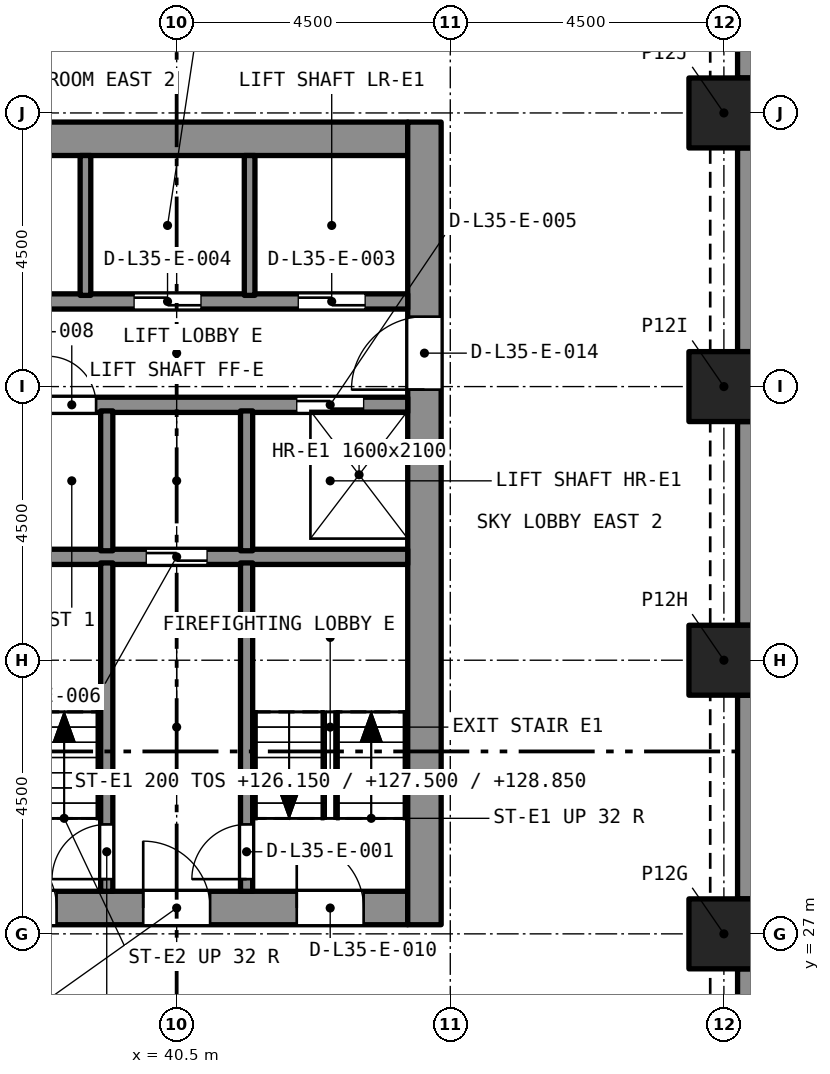
"""IFC4 building model, lengths in metres.
Left out: names, types, materials, properties, quantities, classifications, styles, units other than length and angle.
Written with IfcOpenShell. Run it as: python <this file> out.ifc"""

import sys

from ifc_helpers import new_model, si_unit, direction, frame, frame_2d, origin, origin_2d, place, context, subcontext, project, spatial, rectangle, extrude, element, fill, save


model = new_model("IFC4")
c1 = context("Model", 3, precision=1e-05, world=origin(), true_north=direction((0.0, 1.0)))
c2 = subcontext(c1, "Body", "Model", "MODEL_VIEW")
j1 = project(units=[si_unit("LENGTHUNIT", "METRE"), si_unit("PLANEANGLEUNIT", "RADIAN")], contexts=[c1])
p1 = place(None, origin())
s1 = spatial("IfcSite", under=j1, at=p1, CompositionType="ELEMENT")
p2 = place(p1, origin())
s2 = spatial("IfcBuilding", under=s1, at=p2, CompositionType="ELEMENT")
p3 = place(p2, frame((0.0, 0.0, 124.8)))
s3 = spatial("IfcBuildingStorey", under=s2, at=p3, CompositionType="ELEMENT", Elevation=124.8)
for number, where, z_axis, x_axis in (
    (1, (49.5, 27.0, 0.0), (0.0, 0.0, 1.0), (1.0, 0.0, 0.0)),
    (2, (49.5, 31.5, 0.0), (0.0, 0.0, 1.0), (1.0, 0.0, 0.0)),
    (3, (49.5, 36.0, 0.0), (0.0, 0.0, 1.0), (1.0, 0.0, 0.0)),
    (4, (49.5, 40.5, 0.0), (0.0, 0.0, 1.0), (1.0, 0.0, 0.0)),
):
    element("IfcColumn", number, at=place(p3, frame(where, z_axis=z_axis, x_axis=x_axis)), inside=s3, PredefinedType="COLUMN", context=c2, shape_type="SweptSolid", body=[
        extrude(rectangle(XDim=1.15, YDim=1.15, at=origin_2d()), origin(), (0.0, 0.0, 1.0), 5.4),
    ])
p4 = place(p3, frame((36.7, 27.425, 0.0), z_axis=(0.0, 0.0, 1.0), x_axis=(1.0, 0.0, 0.0)))
e5 = element("IfcWall", 5, at=p4, inside=s3, PredefinedType="SOLIDWALL", context=c2, shape_type="SweptSolid", body=[
    extrude(rectangle(XDim=7.6, YDim=0.55, at=frame_2d((3.8, 0.0))), origin(), (0.0, 0.0, 1.0), 5.4),
])
p5 = place(p4, frame((5.775, 0.0, 0.0)))
e6 = element("IfcOpeningElement", 6, at=p5, cuts=e5, PredefinedType="OPENING", context=c2, shape_type="SweptSolid", body=[
    extrude(rectangle(XDim=1.1, YDim=2.1, at=frame_2d((0.55, 1.05))), frame((0.0, 0.285, 0.0), z_axis=(0.0, -1.0, 0.0), x_axis=(1.0, 0.0, 0.0)), (0.0, 0.0, 1.0), 0.57),
])
p6 = place(p4, frame((3.25, 0.0, 0.0)))
e7 = element("IfcOpeningElement", 7, at=p6, cuts=e5, PredefinedType="OPENING", context=c2, shape_type="SweptSolid", body=[
    extrude(rectangle(XDim=1.1, YDim=2.1, at=frame_2d((0.55, 1.05))), frame((0.0, 0.285, 0.0), z_axis=(0.0, -1.0, 0.0), x_axis=(1.0, 0.0, 0.0)), (0.0, 0.0, 1.0), 0.57),
])
p7 = place(p4, frame((0.725, 0.0, 0.0)))
e8 = element("IfcOpeningElement", 8, at=p7, cuts=e5, PredefinedType="OPENING", context=c2, shape_type="SweptSolid", body=[
    extrude(rectangle(XDim=1.1, YDim=2.1, at=frame_2d((0.55, 1.05))), frame((0.0, 0.285, 0.0), z_axis=(0.0, -1.0, 0.0), x_axis=(1.0, 0.0, 0.0)), (0.0, 0.0, 1.0), 0.57),
])
p8 = place(p3, frame((36.7, 40.075, 0.0), z_axis=(0.0, 0.0, 1.0), x_axis=(1.0, 0.0, 0.0)))
e9 = element("IfcWall", 9, at=p8, inside=s3, PredefinedType="SOLIDWALL", context=c2, shape_type="SweptSolid", body=[
    extrude(rectangle(XDim=7.6, YDim=0.55, at=frame_2d((3.8, 0.0))), origin(), (0.0, 0.0, 1.0), 5.4),
])
p9 = place(p3, frame((44.575, 27.15, 0.0), z_axis=(0.0, 0.0, 1.0), x_axis=(0.0, 1.0, 0.0)))
e10 = element("IfcWall", 10, at=p9, inside=s3, PredefinedType="SOLIDWALL", context=c2, shape_type="SweptSolid", body=[
    extrude(rectangle(XDim=13.2, YDim=0.55, at=frame_2d((6.6, 0.0))), origin(), (0.0, 0.0, 1.0), 5.4),
])
p10 = place(p9, frame((8.8, 0.0, 0.0)))
e11 = element("IfcOpeningElement", 11, at=p10, cuts=e10, PredefinedType="OPENING", context=c2, shape_type="SweptSolid", body=[
    extrude(rectangle(XDim=1.2, YDim=2.1, at=frame_2d((0.6, 1.05))), frame((0.0, 0.285, 0.0), z_axis=(0.0, -1.0, 0.0), x_axis=(1.0, 0.0, 0.0)), (0.0, 0.0, 1.0), 0.57),
])
for number, where, z_axis, x_axis in (
    (12, (49.875, 26.425, 0.0), (0.0, 0.0, 1.0), (0.0, -1.0, 0.0)),
    (13, (49.875, 30.925, 0.0), (0.0, 0.0, 1.0), (0.0, -1.0, 0.0)),
    (14, (49.875, 35.425, 0.0), (0.0, 0.0, 1.0), (0.0, -1.0, 0.0)),
    (15, (49.875, 39.925, 0.0), (0.0, 0.0, 1.0), (0.0, -1.0, 0.0)),
    (16, (49.875, 44.425, 0.0), (0.0, 0.0, 1.0), (0.0, -1.0, 0.0)),
):
    element("IfcWall", number, at=place(p3, frame(where, z_axis=z_axis, x_axis=x_axis)), inside=s3, PredefinedType="SOLIDWALL", context=c2, shape_type="SweptSolid", body=[
        extrude(rectangle(XDim=3.35, YDim=0.3, at=frame_2d((1.675, 0.0))), origin(), (0.0, 0.0, 1.0), 5.4),
    ])
p11 = place(p3, frame((36.7, 33.2, 0.0), z_axis=(0.0, 0.0, 1.0), x_axis=(1.0, 0.0, 0.0)))
e17 = element("IfcWall", 17, at=p11, inside=s3, PredefinedType="SOLIDWALL", context=c2, shape_type="SweptSolid", body=[
    extrude(rectangle(XDim=7.6, YDim=0.25, at=frame_2d((3.8, 0.0))), origin(), (0.0, 0.0, 1.0), 5.1),
])
p12 = place(p11, frame((3.3, 0.0, 0.0)))
e18 = element("IfcOpeningElement", 18, at=p12, cuts=e17, PredefinedType="OPENING", context=c2, shape_type="SweptSolid", body=[
    extrude(rectangle(XDim=1.0, YDim=2.1, at=frame_2d((0.5, 1.05))), frame((0.0, 0.135, 0.0), z_axis=(0.0, -1.0, 0.0), x_axis=(1.0, 0.0, 0.0)), (0.0, 0.0, 1.0), 0.27),
])
p13 = place(p3, frame((36.7, 35.7, 0.0), z_axis=(0.0, 0.0, 1.0), x_axis=(1.0, 0.0, 0.0)))
e19 = element("IfcWall", 19, at=p13, inside=s3, PredefinedType="SOLIDWALL", context=c2, shape_type="SweptSolid", body=[
    extrude(rectangle(XDim=7.6, YDim=0.25, at=frame_2d((3.8, 0.0))), origin(), (0.0, 0.0, 1.0), 5.1),
])
p14 = place(p13, frame((5.775, 0.0, 0.0)))
e20 = element("IfcOpeningElement", 20, at=p14, cuts=e19, PredefinedType="OPENING", context=c2, shape_type="SweptSolid", body=[
    extrude(rectangle(XDim=1.1, YDim=2.4, at=frame_2d((0.55, 1.2))), frame((0.0, 0.135, 0.0), z_axis=(0.0, -1.0, 0.0), x_axis=(1.0, 0.0, 0.0)), (0.0, 0.0, 1.0), 0.27),
])
p15 = place(p13, frame((1.675, 0.0, 0.0)))
e21 = element("IfcOpeningElement", 21, at=p15, cuts=e19, PredefinedType="OPENING", context=c2, shape_type="SweptSolid", body=[
    extrude(rectangle(XDim=0.8, YDim=2.1, at=frame_2d((0.4, 1.05))), frame((0.0, 0.135, 0.0), z_axis=(0.0, -1.0, 0.0), x_axis=(1.0, 0.0, 0.0)), (0.0, 0.0, 1.0), 0.27),
])
p16 = place(p13, frame((0.25, 0.0, 0.0)))
e22 = element("IfcOpeningElement", 22, at=p16, cuts=e19, PredefinedType="OPENING", context=c2, shape_type="SweptSolid", body=[
    extrude(rectangle(XDim=0.9, YDim=2.1, at=frame_2d((0.45, 1.05))), frame((0.0, 0.135, 0.0), z_axis=(0.0, -1.0, 0.0), x_axis=(1.0, 0.0, 0.0)), (0.0, 0.0, 1.0), 0.27),
])
p17 = place(p3, frame((36.7, 37.4, 0.0), z_axis=(0.0, 0.0, 1.0), x_axis=(1.0, 0.0, 0.0)))
e23 = element("IfcWall", 23, at=p17, inside=s3, PredefinedType="SOLIDWALL", context=c2, shape_type="SweptSolid", body=[
    extrude(rectangle(XDim=7.6, YDim=0.25, at=frame_2d((3.8, 0.0))), origin(), (0.0, 0.0, 1.0), 5.1),
])
p18 = place(p17, frame((5.8, 0.0, 0.0)))
e24 = element("IfcOpeningElement", 24, at=p18, cuts=e23, PredefinedType="OPENING", context=c2, shape_type="SweptSolid", body=[
    extrude(rectangle(XDim=1.1, YDim=2.4, at=frame_2d((0.55, 1.2))), frame((0.0, 0.135, 0.0), z_axis=(0.0, -1.0, 0.0), x_axis=(1.0, 0.0, 0.0)), (0.0, 0.0, 1.0), 0.27),
])
p19 = place(p17, frame((3.1, 0.0, 0.0)))
e25 = element("IfcOpeningElement", 25, at=p19, cuts=e23, PredefinedType="OPENING", context=c2, shape_type="SweptSolid", body=[
    extrude(rectangle(XDim=1.1, YDim=2.4, at=frame_2d((0.55, 1.2))), frame((0.0, 0.135, 0.0), z_axis=(0.0, -1.0, 0.0), x_axis=(1.0, 0.0, 0.0)), (0.0, 0.0, 1.0), 0.27),
])
p20 = place(p17, frame((0.75, 0.0, 0.0)))
e26 = element("IfcOpeningElement", 26, at=p20, cuts=e23, PredefinedType="OPENING", context=c2, shape_type="SweptSolid", body=[
    extrude(rectangle(XDim=0.7, YDim=2.1, at=frame_2d((0.35, 1.05))), frame((0.0, 0.135, 0.0), z_axis=(0.0, -1.0, 0.0), x_axis=(1.0, 0.0, 0.0)), (0.0, 0.0, 1.0), 0.27),
])
p21 = place(p3, frame((41.65, 27.7, 0.0), z_axis=(0.0, 0.0, 1.0), x_axis=(0.0, 1.0, 0.0)))
e27 = element("IfcWall", 27, at=p21, inside=s3, PredefinedType="SOLIDWALL", context=c2, shape_type="SweptSolid", body=[
    extrude(rectangle(XDim=5.4, YDim=0.2, at=frame_2d((2.7, 0.0))), origin(), (0.0, 0.0, 1.0), 5.1),
])
p22 = place(p21, frame((0.2, 0.0, 0.0)))
e28 = element("IfcOpeningElement", 28, at=p22, cuts=e27, PredefinedType="OPENING", context=c2, shape_type="SweptSolid", body=[
    extrude(rectangle(XDim=0.9, YDim=2.1, at=frame_2d((0.45, 1.05))), frame((0.0, 0.11, 0.0), z_axis=(0.0, -1.0, 0.0), x_axis=(1.0, 0.0, 0.0)), (0.0, 0.0, 1.0), 0.22),
])
p23 = place(p3, frame((39.35, 27.7, 0.0), z_axis=(0.0, 0.0, 1.0), x_axis=(0.0, 1.0, 0.0)))
e29 = element("IfcWall", 29, at=p23, inside=s3, PredefinedType="SOLIDWALL", context=c2, shape_type="SweptSolid", body=[
    extrude(rectangle(XDim=5.4, YDim=0.2, at=frame_2d((2.7, 0.0))), origin(), (0.0, 0.0, 1.0), 5.1),
])
p24 = place(p23, frame((0.2, 0.0, 0.0)))
e30 = element("IfcOpeningElement", 30, at=p24, cuts=e29, PredefinedType="OPENING", context=c2, shape_type="SweptSolid", body=[
    extrude(rectangle(XDim=0.9, YDim=2.1, at=frame_2d((0.45, 1.05))), frame((0.0, 0.11, 0.0), z_axis=(0.0, -1.0, 0.0), x_axis=(1.0, 0.0, 0.0)), (0.0, 0.0, 1.0), 0.22),
])
for number, where, z_axis, x_axis in (
    (31, (41.65, 33.3, 0.0), (0.0, 0.0, 1.0), (0.0, 1.0, 0.0)),
    (32, (39.35, 33.3, 0.0), (0.0, 0.0, 1.0), (0.0, 1.0, 0.0)),
):
    element("IfcWall", number, at=place(p3, frame(where, z_axis=z_axis, x_axis=x_axis)), inside=s3, PredefinedType="SOLIDWALL", context=c2, shape_type="SweptSolid", body=[
        extrude(rectangle(XDim=2.3, YDim=0.2, at=frame_2d((1.15, 0.0))), origin(), (0.0, 0.0, 1.0), 5.1),
    ])
for number, where, z_axis, x_axis in (
    (33, (41.7, 37.5, 0.0), (0.0, 0.0, 1.0), (0.0, 1.0, 0.0)),
    (34, (39.0, 37.5, 0.0), (0.0, 0.0, 1.0), (0.0, 1.0, 0.0)),
):
    element("IfcWall", number, at=place(p3, frame(where, z_axis=z_axis, x_axis=x_axis)), inside=s3, PredefinedType="SOLIDWALL", context=c2, shape_type="SweptSolid", body=[
        extrude(rectangle(XDim=2.3, YDim=0.175, at=frame_2d((1.15, 0.0))), origin(), (0.0, 0.0, 1.0), 5.1),
    ])
p25 = place(p22, origin())
e35 = element("IfcDoor", 35, at=p25, inside=s3, OperationType="SINGLE_SWING_LEFT", PredefinedType="DOOR", context=c2, shape_type="SweptSolid", body=[
    extrude(rectangle(XDim=0.9, YDim=2.1, at=frame_2d((0.45, 1.05))), frame((0.0, 0.025, 0.0), z_axis=(0.0, -1.0, 0.0), x_axis=(1.0, 0.0, 0.0)), (0.0, 0.0, 1.0), 0.05),
])
fill(e28, e35)
p26 = place(p24, origin())
e36 = element("IfcDoor", 36, at=p26, inside=s3, OperationType="SINGLE_SWING_LEFT", PredefinedType="DOOR", context=c2, shape_type="SweptSolid", body=[
    extrude(rectangle(XDim=0.9, YDim=2.1, at=frame_2d((0.45, 1.05))), frame((0.0, 0.025, 0.0), z_axis=(0.0, -1.0, 0.0), x_axis=(1.0, 0.0, 0.0)), (0.0, 0.0, 1.0), 0.05),
])
fill(e30, e36)
p27 = place(p18, origin())
e37 = element("IfcDoor", 37, at=p27, inside=s3, OperationType="SLIDING_TO_LEFT", PredefinedType="DOOR", context=c2, shape_type="SweptSolid", body=[
    extrude(rectangle(XDim=1.1, YDim=2.4, at=frame_2d((0.55, 1.2))), frame((0.0, 0.025, 0.0), z_axis=(0.0, -1.0, 0.0), x_axis=(1.0, 0.0, 0.0)), (0.0, 0.0, 1.0), 0.05),
])
fill(e24, e37)
p28 = place(p19, origin())
e38 = element("IfcDoor", 38, at=p28, inside=s3, OperationType="SLIDING_TO_LEFT", PredefinedType="DOOR", context=c2, shape_type="SweptSolid", body=[
    extrude(rectangle(XDim=1.1, YDim=2.4, at=frame_2d((0.55, 1.2))), frame((0.0, 0.025, 0.0), z_axis=(0.0, -1.0, 0.0), x_axis=(1.0, 0.0, 0.0)), (0.0, 0.0, 1.0), 0.05),
])
fill(e25, e38)
p29 = place(p14, origin())
e39 = element("IfcDoor", 39, at=p29, inside=s3, OperationType="SLIDING_TO_LEFT", PredefinedType="DOOR", context=c2, shape_type="SweptSolid", body=[
    extrude(rectangle(XDim=1.1, YDim=2.4, at=frame_2d((0.55, 1.2))), frame((0.0, 0.025, 0.0), z_axis=(0.0, -1.0, 0.0), x_axis=(1.0, 0.0, 0.0)), (0.0, 0.0, 1.0), 0.05),
])
fill(e20, e39)
p30 = place(p12, origin())
e40 = element("IfcDoor", 40, at=p30, inside=s3, OperationType="SLIDING_TO_LEFT", PredefinedType="DOOR", context=c2, shape_type="SweptSolid", body=[
    extrude(rectangle(XDim=1.0, YDim=2.1, at=frame_2d((0.5, 1.05))), frame((0.0, 0.025, 0.0), z_axis=(0.0, -1.0, 0.0), x_axis=(1.0, 0.0, 0.0)), (0.0, 0.0, 1.0), 0.05),
])
fill(e18, e40)
p31 = place(p15, origin())
e41 = element("IfcDoor", 41, at=p31, inside=s3, OperationType="SINGLE_SWING_LEFT", PredefinedType="DOOR", context=c2, shape_type="SweptSolid", body=[
    extrude(rectangle(XDim=0.8, YDim=2.1, at=frame_2d((0.4, 1.05))), frame((0.0, 0.025, 0.0), z_axis=(0.0, -1.0, 0.0), x_axis=(1.0, 0.0, 0.0)), (0.0, 0.0, 1.0), 0.05),
])
fill(e21, e41)
p32 = place(p5, origin())
e42 = element("IfcDoor", 42, at=p32, inside=s3, OperationType="SINGLE_SWING_LEFT", PredefinedType="DOOR", context=c2, shape_type="SweptSolid", body=[
    extrude(rectangle(XDim=1.1, YDim=2.1, at=frame_2d((0.55, 1.05))), frame((0.0, 0.025, 0.0), z_axis=(0.0, -1.0, 0.0), x_axis=(1.0, 0.0, 0.0)), (0.0, 0.0, 1.0), 0.05),
])
fill(e6, e42)
p33 = place(p6, origin())
e43 = element("IfcDoor", 43, at=p33, inside=s3, OperationType="SINGLE_SWING_LEFT", PredefinedType="DOOR", context=c2, shape_type="SweptSolid", body=[
    extrude(rectangle(XDim=1.1, YDim=2.1, at=frame_2d((0.55, 1.05))), frame((0.0, 0.025, 0.0), z_axis=(0.0, -1.0, 0.0), x_axis=(1.0, 0.0, 0.0)), (0.0, 0.0, 1.0), 0.05),
])
fill(e7, e43)
p34 = place(p7, origin())
e44 = element("IfcDoor", 44, at=p34, inside=s3, OperationType="SINGLE_SWING_LEFT", PredefinedType="DOOR", context=c2, shape_type="SweptSolid", body=[
    extrude(rectangle(XDim=1.1, YDim=2.1, at=frame_2d((0.55, 1.05))), frame((0.0, 0.025, 0.0), z_axis=(0.0, -1.0, 0.0), x_axis=(1.0, 0.0, 0.0)), (0.0, 0.0, 1.0), 0.05),
])
fill(e8, e44)
p35 = place(p10, origin())
e45 = element("IfcDoor", 45, at=p35, inside=s3, OperationType="SINGLE_SWING_LEFT", PredefinedType="DOOR", context=c2, shape_type="SweptSolid", body=[
    extrude(rectangle(XDim=1.2, YDim=2.1, at=frame_2d((0.6, 1.05))), frame((0.0, 0.025, 0.0), z_axis=(0.0, -1.0, 0.0), x_axis=(1.0, 0.0, 0.0)), (0.0, 0.0, 1.0), 0.05),
])
fill(e11, e45)
save(model, sys.argv[1])
